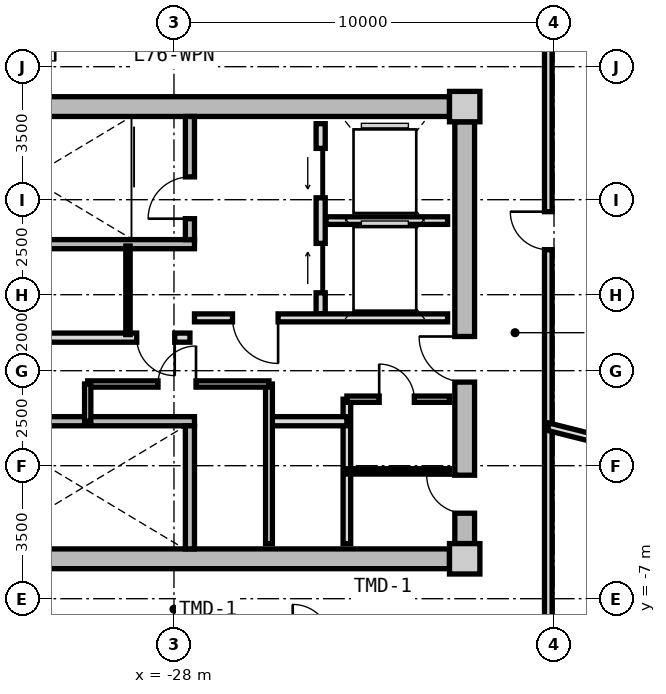
"""IFC4 building model, lengths in metres.
Left out: names, types, materials, properties, quantities, classifications, styles, units other than length and angle.
Written with IfcOpenShell. Run it as: python <this file> out.ifc"""

import sys

from ifc_helpers import new_model, si_unit, direction, frame, frame_2d, origin, origin_2d, place, context, subcontext, project, spatial, rectangle, extrude, source, transform, mapped, element, fill, save


model = new_model("IFC4")
c1 = context("Model", 3, precision=1e-05, world=origin(), true_north=direction((0.0, 1.0)))
c2 = subcontext(c1, "Body", "Model", "MODEL_VIEW")
j1 = project(units=[si_unit("LENGTHUNIT", "METRE"), si_unit("PLANEANGLEUNIT", "RADIAN")], contexts=[c1])
p1 = place(None, origin())
s1 = spatial("IfcSite", under=j1, at=p1, CompositionType="ELEMENT")
p2 = place(p1, origin())
s2 = spatial("IfcBuilding", under=s1, at=p2, CompositionType="ELEMENT")
p3 = place(p2, frame((0.0, 0.0, 244.4)))
s3 = spatial("IfcBuildingStorey", under=s2, at=p3, CompositionType="ELEMENT", Elevation=244.4)
m1 = source(origin(), c2, "Body", "SweptSolid", [
    extrude(rectangle(XDim=0.8, YDim=0.8, at=origin_2d()), origin(), (0.0, 0.0, 1.0), 5.45),
])
for number, where, z_axis, x_axis in (
    (1, (-20.35, -5.95, 0.0), (0.0, 0.0, 1.0), (1.0, 0.0, 0.0)),
    (2, (-20.35, 5.95, 0.0), (0.0, 0.0, 1.0), (1.0, 0.0, 0.0)),
):
    element("IfcColumn", number, at=place(p3, frame(where, z_axis=z_axis, x_axis=x_axis)), inside=s3, PredefinedType="COLUMN", context=c2, shape_type="MappedRepresentation", body=[
        mapped(m1, transform((0.0, 0.0, 0.0), x_axis=(1.0, 0.0, 0.0), y_axis=(0.0, 1.0, 0.0), z_axis=(0.0, 0.0, 1.0), scale=1.0)),
    ])
m2 = source(origin(), c2, "Body", "SweptSolid", [
    extrude(rectangle(XDim=14.5, YDim=0.52, at=frame_2d((7.25, 0.0))), origin(), (0.0, 0.0, 1.0), 5.175),
])
for number, where, z_axis, x_axis in (
    (3, (-35.25, 5.95, 0.0), (0.0, 0.0, 1.0), (1.0, 0.0, 0.0)),
    (4, (-20.75, -5.95, 0.0), (0.0, 0.0, 1.0), (-1.0, 0.0, 0.0)),
):
    element("IfcWall", number, at=place(p3, frame(where, z_axis=z_axis, x_axis=x_axis)), inside=s3, PredefinedType="SHEAR", context=c2, shape_type="MappedRepresentation", body=[
        mapped(m2, transform((0.0, 0.0, 0.0), x_axis=(1.0, 0.0, 0.0), y_axis=(0.0, 1.0, 0.0), z_axis=(0.0, 0.0, 1.0), scale=1.0)),
    ])
m3 = source(origin(), c2, "Body", "SweptSolid", [
    extrude(rectangle(XDim=11.1, YDim=0.52, at=frame_2d((5.55, 0.0))), origin(), (0.0, 0.0, 1.0), 5.175),
])
p4 = place(p3, frame((-20.35, 5.55, 0.0), z_axis=(0.0, 0.0, 1.0), x_axis=(0.0, -1.0, 0.0)))
e5 = element("IfcWall", 5, at=p4, inside=s3, PredefinedType="SHEAR", context=c2, shape_type="MappedRepresentation", body=[
    mapped(m3, transform((0.0, 0.0, 0.0), x_axis=(1.0, 0.0, 0.0), y_axis=(0.0, 1.0, 0.0), z_axis=(0.0, 0.0, 1.0), scale=1.0)),
])
p5 = place(p4, frame((5.65, 0.0, 0.0)))
e6 = element("IfcOpeningElement", 6, at=p5, cuts=e5, PredefinedType="OPENING", context=c2, shape_type="SweptSolid", body=[
    extrude(rectangle(XDim=1.2, YDim=2.15, at=frame_2d((0.6, 1.075))), frame((0.0, 0.27, 0.0), z_axis=(0.0, -1.0, 0.0), x_axis=(1.0, 0.0, 0.0)), (0.0, 0.0, 1.0), 0.54),
])
p6 = place(p4, frame((9.3, 0.0, 0.0)))
e7 = element("IfcOpeningElement", 7, at=p6, cuts=e5, PredefinedType="OPENING", context=c2, shape_type="SweptSolid", body=[
    extrude(rectangle(XDim=1.0, YDim=2.1, at=frame_2d((0.5, 1.05))), frame((0.0, 0.27, 0.0), z_axis=(0.0, -1.0, 0.0), x_axis=(1.0, 0.0, 0.0)), (0.0, 0.0, 1.0), 0.54),
])
m4 = source(origin(), c2, "Body", "SweptSolid", [
    extrude(rectangle(XDim=7.93, YDim=0.24, at=frame_2d((3.965, 0.0))), origin(), (0.0, 0.0, 1.0), 5.175),
])
p7 = place(p3, frame((-35.39, 2.33, 0.0), z_axis=(0.0, 0.0, 1.0), x_axis=(1.0, 0.0, 0.0)))
e8 = element("IfcWall", 8, at=p7, inside=s3, PredefinedType="PARTITIONING", context=c2, shape_type="MappedRepresentation", body=[
    mapped(m4, transform((0.0, 0.0, 0.0), x_axis=(1.0, 0.0, 0.0), y_axis=(0.0, 1.0, 0.0), z_axis=(0.0, 0.0, 1.0), scale=1.0)),
])
m5 = source(origin(), c2, "Body", "SweptSolid", [
    extrude(rectangle(XDim=3.24, YDim=0.24, at=frame_2d((1.62, 0.0))), origin(), (0.0, 0.0, 1.0), 5.175),
])
p8 = place(p3, frame((-27.58, 2.45, 0.0), z_axis=(0.0, 0.0, 1.0), x_axis=(0.0, 1.0, 0.0)))
e9 = element("IfcWall", 9, at=p8, inside=s3, PredefinedType="PARTITIONING", context=c2, shape_type="MappedRepresentation", body=[
    mapped(m5, transform((0.0, 0.0, 0.0), x_axis=(1.0, 0.0, 0.0), y_axis=(0.0, 1.0, 0.0), z_axis=(0.0, 0.0, 1.0), scale=1.0)),
])
p9 = place(p8, frame((0.55, 0.0, 0.0)))
e10 = element("IfcOpeningElement", 10, at=p9, cuts=e9, PredefinedType="OPENING", context=c2, shape_type="SweptSolid", body=[
    extrude(rectangle(XDim=1.1, YDim=2.15, at=frame_2d((0.55, 1.075))), frame((0.0, 0.13, 0.0), z_axis=(0.0, -1.0, 0.0), x_axis=(1.0, 0.0, 0.0)), (0.0, 0.0, 1.0), 0.26),
])
p10 = place(p3, frame((-35.39, -2.33, 0.0), z_axis=(0.0, 0.0, 1.0), x_axis=(1.0, 0.0, 0.0)))
e11 = element("IfcWall", 11, at=p10, inside=s3, PredefinedType="PARTITIONING", context=c2, shape_type="MappedRepresentation", body=[
    mapped(m4, transform((0.0, 0.0, 0.0), x_axis=(1.0, 0.0, 0.0), y_axis=(0.0, 1.0, 0.0), z_axis=(0.0, 0.0, 1.0), scale=1.0)),
])
p11 = place(p10, frame((1.05, 0.0, 0.0)))
e12 = element("IfcOpeningElement", 12, at=p11, cuts=e11, PredefinedType="OPENING", context=c2, shape_type="SweptSolid", body=[
    extrude(rectangle(XDim=1.1, YDim=2.15, at=frame_2d((0.55, 1.075))), frame((0.0, 0.13, 0.0), z_axis=(0.0, -1.0, 0.0), x_axis=(1.0, 0.0, 0.0)), (0.0, 0.0, 1.0), 0.26),
])
p12 = place(p3, frame((-27.58, -5.69, 0.0), z_axis=(0.0, 0.0, 1.0), x_axis=(0.0, 1.0, 0.0)))
e13 = element("IfcWall", 13, at=p12, inside=s3, PredefinedType="PARTITIONING", context=c2, shape_type="MappedRepresentation", body=[
    mapped(m5, transform((0.0, 0.0, 0.0), x_axis=(1.0, 0.0, 0.0), y_axis=(0.0, 1.0, 0.0), z_axis=(0.0, 0.0, 1.0), scale=1.0)),
])
m6 = source(origin(), c2, "Body", "SweptSolid", [
    extrude(rectangle(XDim=5.0, YDim=0.24, at=frame_2d((2.5, 0.0))), origin(), (0.0, 0.0, 1.0), 5.16),
])
p13 = place(p3, frame((-24.14, 0.5, 0.0), z_axis=(0.0, 0.0, 1.0), x_axis=(0.0, 1.0, 0.0)))
e14 = element("IfcWall", 14, at=p13, inside=s3, PredefinedType="PARTITIONING", context=c2, shape_type="MappedRepresentation", body=[
    mapped(m6, transform((0.0, 0.0, 0.0), x_axis=(1.0, 0.0, 0.0), y_axis=(0.0, 1.0, 0.0), z_axis=(0.0, 0.0, 1.0), scale=1.0)),
])
p14 = place(p13, frame((3.05, 0.0, 0.0)))
e15 = element("IfcOpeningElement", 15, at=p14, cuts=e14, PredefinedType="OPENING", context=c2, shape_type="SweptSolid", body=[
    extrude(rectangle(XDim=1.3, YDim=2.2, at=frame_2d((0.65, 1.1))), frame((0.0, 0.13, 0.0), z_axis=(0.0, -1.0, 0.0), x_axis=(1.0, 0.0, 0.0)), (0.0, 0.0, 1.0), 0.26),
])
p15 = place(p13, frame((0.55, 0.0, 0.0)))
e16 = element("IfcOpeningElement", 16, at=p15, cuts=e14, PredefinedType="OPENING", context=c2, shape_type="SweptSolid", body=[
    extrude(rectangle(XDim=1.3, YDim=2.2, at=frame_2d((0.65, 1.1))), frame((0.0, 0.13, 0.0), z_axis=(0.0, -1.0, 0.0), x_axis=(1.0, 0.0, 0.0)), (0.0, 0.0, 1.0), 0.26),
])
m7 = source(origin(), c2, "Body", "SweptSolid", [
    extrude(rectangle(XDim=3.2, YDim=0.2, at=frame_2d((1.6, 0.0))), origin(), (0.0, 0.0, 1.0), 5.16),
])
p16 = place(p3, frame((-24.0, 2.95, 0.0), z_axis=(0.0, 0.0, 1.0), x_axis=(1.0, 0.0, 0.0)))
e17 = element("IfcWall", 17, at=p16, inside=s3, PredefinedType="PARTITIONING", context=c2, shape_type="MappedRepresentation", body=[
    mapped(m7, transform((0.0, 0.0, 0.0), x_axis=(1.0, 0.0, 0.0), y_axis=(0.0, 1.0, 0.0), z_axis=(0.0, 0.0, 1.0), scale=1.0)),
])
m8 = source(origin(), c2, "Body", "SweptSolid", [
    extrude(rectangle(XDim=6.66, YDim=0.21, at=frame_2d((3.33, 0.0))), origin(), (0.0, 0.0, 1.0), 5.16),
])
p17 = place(p3, frame((-27.46, 0.39, 0.0), z_axis=(0.0, 0.0, 1.0), x_axis=(1.0, 0.0, 0.0)))
e18 = element("IfcWall", 18, at=p17, inside=s3, PredefinedType="PARTITIONING", context=c2, shape_type="MappedRepresentation", body=[
    mapped(m8, transform((0.0, 0.0, 0.0), x_axis=(1.0, 0.0, 0.0), y_axis=(0.0, 1.0, 0.0), z_axis=(0.0, 0.0, 1.0), scale=1.0)),
])
p18 = place(p17, frame((1.0, 0.0, 0.0)))
e19 = element("IfcOpeningElement", 19, at=p18, cuts=e18, PredefinedType="OPENING", context=c2, shape_type="SweptSolid", body=[
    extrude(rectangle(XDim=1.2, YDim=2.15, at=frame_2d((0.6, 1.075))), frame((0.0, 0.115, 0.0), z_axis=(0.0, -1.0, 0.0), x_axis=(1.0, 0.0, 0.0)), (0.0, 0.0, 1.0), 0.23),
])
m9 = source(origin(), c2, "Body", "SweptSolid", [
    extrude(rectangle(XDim=7.62, YDim=0.24, at=frame_2d((3.81, 0.0))), origin(), (0.0, 0.0, 1.0), 5.16),
])
p19 = place(p3, frame((-35.2, -0.13, 0.0), z_axis=(0.0, 0.0, 1.0), x_axis=(1.0, 0.0, 0.0)))
e20 = element("IfcWall", 20, at=p19, inside=s3, PredefinedType="PARTITIONING", context=c2, shape_type="MappedRepresentation", body=[
    mapped(m9, transform((0.0, 0.0, 0.0), x_axis=(1.0, 0.0, 0.0), y_axis=(0.0, 1.0, 0.0), z_axis=(0.0, 0.0, 1.0), scale=1.0)),
])
p20 = place(p19, frame((6.22, 0.0, 0.0)))
e21 = element("IfcOpeningElement", 21, at=p20, cuts=e20, PredefinedType="OPENING", context=c2, shape_type="SweptSolid", body=[
    extrude(rectangle(XDim=1.0, YDim=2.1, at=frame_2d((0.5, 1.05))), frame((0.0, 0.13, 0.0), z_axis=(0.0, -1.0, 0.0), x_axis=(1.0, 0.0, 0.0)), (0.0, 0.0, 1.0), 0.26),
])
p21 = place(p19, frame((2.4, 0.0, 0.0)))
e22 = element("IfcOpeningElement", 22, at=p21, cuts=e20, PredefinedType="OPENING", context=c2, shape_type="SweptSolid", body=[
    extrude(rectangle(XDim=1.0, YDim=2.1, at=frame_2d((0.5, 1.05))), frame((0.0, 0.13, 0.0), z_axis=(0.0, -1.0, 0.0), x_axis=(1.0, 0.0, 0.0)), (0.0, 0.0, 1.0), 0.26),
])
m10 = source(origin(), c2, "Body", "SweptSolid", [
    extrude(rectangle(XDim=2.33, YDim=0.115, at=frame_2d((1.165, 0.0))), origin(), (0.0, 0.0, 1.0), 5.16),
])
p22 = place(p3, frame((-29.21, -0.05, 0.0), z_axis=(0.0, 0.0, 1.0), x_axis=(0.0, 1.0, 0.0)))
e23 = element("IfcWall", 23, at=p22, inside=s3, PredefinedType="PARTITIONING", context=c2, shape_type="MappedRepresentation", body=[
    mapped(m10, transform((0.0, 0.0, 0.0), x_axis=(1.0, 0.0, 0.0), y_axis=(0.0, 1.0, 0.0), z_axis=(0.0, 0.0, 1.0), scale=1.0)),
])
m11 = source(origin(), c2, "Body", "SweptSolid", [
    extrude(rectangle(XDim=3.8, YDim=0.2, at=frame_2d((1.9, 0.0))), origin(), (0.0, 0.0, 1.0), 5.16),
])
p23 = place(p3, frame((-23.45, -5.55, 0.0), z_axis=(0.0, 0.0, 1.0), x_axis=(0.0, 1.0, 0.0)))
e24 = element("IfcWall", 24, at=p23, inside=s3, PredefinedType="PARTITIONING", context=c2, shape_type="MappedRepresentation", body=[
    mapped(m11, transform((0.0, 0.0, 0.0), x_axis=(1.0, 0.0, 0.0), y_axis=(0.0, 1.0, 0.0), z_axis=(0.0, 0.0, 1.0), scale=1.0)),
])
m12 = source(origin(), c2, "Body", "SweptSolid", [
    extrude(rectangle(XDim=2.05, YDim=0.24, at=frame_2d((1.025, 0.0))), origin(), (0.0, 0.0, 1.0), 5.16),
])
p24 = place(p3, frame((-25.5, -2.33, 0.0), z_axis=(0.0, 0.0, 1.0), x_axis=(1.0, 0.0, 0.0)))
e25 = element("IfcWall", 25, at=p24, inside=s3, PredefinedType="PARTITIONING", context=c2, shape_type="MappedRepresentation", body=[
    mapped(m12, transform((0.0, 0.0, 0.0), x_axis=(1.0, 0.0, 0.0), y_axis=(0.0, 1.0, 0.0), z_axis=(0.0, 0.0, 1.0), scale=1.0)),
])
m13 = source(origin(), c2, "Body", "SweptSolid", [
    extrude(rectangle(XDim=4.2, YDim=0.18, at=frame_2d((2.1, 0.0))), origin(), (0.0, 0.0, 1.0), 5.16),
])
p25 = place(p3, frame((-25.5, -5.55, 0.0), z_axis=(0.0, 0.0, 1.0), x_axis=(0.0, 1.0, 0.0)))
e26 = element("IfcWall", 26, at=p25, inside=s3, PredefinedType="PARTITIONING", context=c2, shape_type="MappedRepresentation", body=[
    mapped(m13, transform((0.0, 0.0, 0.0), x_axis=(1.0, 0.0, 0.0), y_axis=(0.0, 1.0, 0.0), z_axis=(0.0, 0.0, 1.0), scale=1.0)),
])
m14 = source(origin(), c2, "Body", "SweptSolid", [
    extrude(rectangle(XDim=4.77, YDim=0.165, at=frame_2d((2.385, 0.0))), origin(), (0.0, 0.0, 1.0), 5.16),
])
p26 = place(p3, frame((-30.27, -1.35, 0.0), z_axis=(0.0, 0.0, 1.0), x_axis=(1.0, 0.0, 0.0)))
e27 = element("IfcWall", 27, at=p26, inside=s3, PredefinedType="PARTITIONING", context=c2, shape_type="MappedRepresentation", body=[
    mapped(m14, transform((0.0, 0.0, 0.0), x_axis=(1.0, 0.0, 0.0), y_axis=(0.0, 1.0, 0.0), z_axis=(0.0, 0.0, 1.0), scale=1.0)),
])
p27 = place(p26, frame((1.85, 0.0, 0.0)))
e28 = element("IfcOpeningElement", 28, at=p27, cuts=e27, PredefinedType="OPENING", context=c2, shape_type="SweptSolid", body=[
    extrude(rectangle(XDim=1.0, YDim=2.1, at=frame_2d((0.5, 1.05))), frame((0.0, 0.093, 0.0), z_axis=(0.0, -1.0, 0.0), x_axis=(1.0, 0.0, 0.0)), (0.0, 0.0, 1.0), 0.185),
])
m15 = source(origin(), c2, "Body", "SweptSolid", [
    extrude(rectangle(XDim=0.98, YDim=0.165, at=frame_2d((0.49, 0.0))), origin(), (0.0, 0.0, 1.0), 5.16),
])
p28 = place(p3, frame((-30.27, -2.33, 0.0), z_axis=(0.0, 0.0, 1.0), x_axis=(0.0, 1.0, 0.0)))
e29 = element("IfcWall", 29, at=p28, inside=s3, PredefinedType="PARTITIONING", context=c2, shape_type="MappedRepresentation", body=[
    mapped(m15, transform((0.0, 0.0, 0.0), x_axis=(1.0, 0.0, 0.0), y_axis=(0.0, 1.0, 0.0), z_axis=(0.0, 0.0, 1.0), scale=1.0)),
])
m16 = source(origin(), c2, "Body", "SweptSolid", [
    extrude(rectangle(XDim=2.7, YDim=0.165, at=frame_2d((1.35, 0.0))), origin(), (0.0, 0.0, 1.0), 5.16),
])
p29 = place(p3, frame((-23.45, -1.75, 0.0), z_axis=(0.0, 0.0, 1.0), x_axis=(1.0, 0.0, 0.0)))
e30 = element("IfcWall", 30, at=p29, inside=s3, PredefinedType="PARTITIONING", context=c2, shape_type="MappedRepresentation", body=[
    mapped(m16, transform((0.0, 0.0, 0.0), x_axis=(1.0, 0.0, 0.0), y_axis=(0.0, 1.0, 0.0), z_axis=(0.0, 0.0, 1.0), scale=1.0)),
])
p30 = place(p29, frame((0.85, 0.0, 0.0)))
e31 = element("IfcOpeningElement", 31, at=p30, cuts=e30, PredefinedType="OPENING", context=c2, shape_type="SweptSolid", body=[
    extrude(rectangle(XDim=0.925, YDim=2.1, at=frame_2d((0.462, 1.05))), frame((0.0, 0.093, 0.0), z_axis=(0.0, -1.0, 0.0), x_axis=(1.0, 0.0, 0.0)), (0.0, 0.0, 1.0), 0.185),
])
m17 = source(origin(), c2, "Body", "SweptSolid", [
    extrude(rectangle(XDim=2.7, YDim=0.14, at=frame_2d((1.35, 0.0))), origin(), (0.0, 0.0, 1.0), 5.16),
])
p31 = place(p3, frame((-23.45, -3.65, 0.0), z_axis=(0.0, 0.0, 1.0), x_axis=(1.0, 0.0, 0.0)))
e32 = element("IfcWall", 32, at=p31, inside=s3, PredefinedType="PARTITIONING", context=c2, shape_type="MappedRepresentation", body=[
    mapped(m17, transform((0.0, 0.0, 0.0), x_axis=(1.0, 0.0, 0.0), y_axis=(0.0, 1.0, 0.0), z_axis=(0.0, 0.0, 1.0), scale=1.0)),
])
m18 = source(origin(), c2, "Body", "SweptSolid", [
    extrude(rectangle(XDim=16.3, YDim=0.2, at=frame_2d((8.15, 0.0))), origin(), (0.0, 0.0, 1.0), 5.16),
])
p32 = place(p3, frame((-18.15, 8.15, 0.0), z_axis=(0.0, 0.0, 1.0), x_axis=(0.0, -1.0, 0.0)))
e33 = element("IfcWall", 33, at=p32, inside=s3, PredefinedType="PARTITIONING", context=c2, shape_type="MappedRepresentation", body=[
    mapped(m18, transform((0.0, 0.0, 0.0), x_axis=(1.0, 0.0, 0.0), y_axis=(0.0, 1.0, 0.0), z_axis=(0.0, 0.0, 1.0), scale=1.0)),
])
p33 = place(p32, frame((4.966, 0.0, 0.0)))
e34 = element("IfcOpeningElement", 34, at=p33, cuts=e33, PredefinedType="OPENING", context=c2, shape_type="SweptSolid", body=[
    extrude(rectangle(XDim=1.0, YDim=2.1, at=frame_2d((0.5, 1.05))), frame((0.0, 0.11, 0.0), z_axis=(0.0, -1.0, 0.0), x_axis=(1.0, 0.0, 0.0)), (0.0, 0.0, 1.0), 0.22),
])
m19 = source(origin(), c2, "Body", "SweptSolid", [
    extrude(rectangle(XDim=5.879, YDim=0.2, at=frame_2d((2.939, 0.0))), origin(), (0.0, 0.0, 1.0), 4.76),
])
p34 = place(p3, frame((-18.15, -2.475, 0.0), z_axis=(0.0, 0.0, 1.0), x_axis=(0.96984127658, -0.24373735504, 0.0)))
e35 = element("IfcWall", 35, at=p34, inside=s3, PredefinedType="PARTITIONING", context=c2, shape_type="MappedRepresentation", body=[
    mapped(m19, transform((0.0, 0.0, 0.0), x_axis=(1.0, 0.0, 0.0), y_axis=(0.0, 1.0, 0.0), z_axis=(0.0, 0.0, 1.0), scale=1.0)),
])
m20 = source(origin(), c2, "Body", "SweptSolid", [
    extrude(rectangle(XDim=1.1, YDim=2.15, at=frame_2d((0.55, 1.075))), frame((0.0, 0.025, 0.0), z_axis=(0.0, -1.0, 0.0), x_axis=(1.0, 0.0, 0.0)), (0.0, 0.0, 1.0), 0.05),
])
p35 = place(p9, origin())
e36 = element("IfcDoor", 36, at=p35, inside=s3, OperationType="SINGLE_SWING_LEFT", PredefinedType="DOOR", context=c2, shape_type="MappedRepresentation", body=[
    mapped(m20, transform((0.0, 0.0, 0.0), x_axis=(1.0, 0.0, 0.0), y_axis=(0.0, 1.0, 0.0), z_axis=(0.0, 0.0, 1.0), scale=1.0)),
])
fill(e10, e36)
m21 = source(origin(), c2, "Body", "SweptSolid", [
    extrude(rectangle(XDim=1.3, YDim=2.2, at=frame_2d((0.65, 1.1))), frame((0.0, 0.025, 0.0), z_axis=(0.0, -1.0, 0.0), x_axis=(1.0, 0.0, 0.0)), (0.0, 0.0, 1.0), 0.05),
])
p36 = place(p14, origin())
e37 = element("IfcDoor", 37, at=p36, inside=s3, OperationType="SLIDING_TO_LEFT", PredefinedType="DOOR", context=c2, shape_type="MappedRepresentation", body=[
    mapped(m21, transform((0.0, 0.0, 0.0), x_axis=(1.0, 0.0, 0.0), y_axis=(0.0, 1.0, 0.0), z_axis=(0.0, 0.0, 1.0), scale=1.0)),
])
fill(e15, e37)
p37 = place(p15, origin())
e38 = element("IfcDoor", 38, at=p37, inside=s3, OperationType="SLIDING_TO_RIGHT", PredefinedType="DOOR", context=c2, shape_type="MappedRepresentation", body=[
    mapped(m21, transform((0.0, 0.0, 0.0), x_axis=(1.0, 0.0, 0.0), y_axis=(0.0, 1.0, 0.0), z_axis=(0.0, 0.0, 1.0), scale=1.0)),
])
fill(e16, e38)
m22 = source(origin(), c2, "Body", "SweptSolid", [
    extrude(rectangle(XDim=1.2, YDim=2.15, at=frame_2d((0.6, 1.075))), frame((0.0, 0.025, 0.0), z_axis=(0.0, -1.0, 0.0), x_axis=(1.0, 0.0, 0.0)), (0.0, 0.0, 1.0), 0.05),
])
p38 = place(p18, frame((1.2, 0.0, 0.0), z_axis=(0.0, 0.0, 1.0), x_axis=(-1.0, 0.0, 0.0)))
e39 = element("IfcDoor", 39, at=p38, inside=s3, OperationType="SINGLE_SWING_LEFT", PredefinedType="DOOR", context=c2, shape_type="MappedRepresentation", body=[
    mapped(m22, transform((0.0, 0.0, 0.0), x_axis=(1.0, 0.0, 0.0), y_axis=(0.0, 1.0, 0.0), z_axis=(0.0, 0.0, 1.0), scale=1.0)),
])
fill(e19, e39)
p39 = place(p5, frame((1.2, 0.0, 0.0), z_axis=(0.0, 0.0, 1.0), x_axis=(-1.0, 0.0, 0.0)))
e40 = element("IfcDoor", 40, at=p39, inside=s3, OperationType="SINGLE_SWING_RIGHT", PredefinedType="DOOR", context=c2, shape_type="MappedRepresentation", body=[
    mapped(m22, transform((0.0, 0.0, 0.0), x_axis=(1.0, 0.0, 0.0), y_axis=(0.0, 1.0, 0.0), z_axis=(0.0, 0.0, 1.0), scale=1.0)),
])
fill(e6, e40)
m23 = source(origin(), c2, "Body", "SweptSolid", [
    extrude(rectangle(XDim=1.0, YDim=2.1, at=frame_2d((0.5, 1.05))), frame((0.0, 0.025, 0.0), z_axis=(0.0, -1.0, 0.0), x_axis=(1.0, 0.0, 0.0)), (0.0, 0.0, 1.0), 0.05),
])
p40 = place(p20, frame((1.0, 0.0, 0.0), z_axis=(0.0, 0.0, 1.0), x_axis=(-1.0, 0.0, 0.0)))
e41 = element("IfcDoor", 41, at=p40, inside=s3, OperationType="SINGLE_SWING_LEFT", PredefinedType="DOOR", context=c2, shape_type="MappedRepresentation", body=[
    mapped(m23, transform((0.0, 0.0, 0.0), x_axis=(1.0, 0.0, 0.0), y_axis=(0.0, 1.0, 0.0), z_axis=(0.0, 0.0, 1.0), scale=1.0)),
])
fill(e21, e41)
p41 = place(p27, origin())
e42 = element("IfcDoor", 42, at=p41, inside=s3, OperationType="SINGLE_SWING_RIGHT", PredefinedType="DOOR", context=c2, shape_type="MappedRepresentation", body=[
    mapped(m23, transform((0.0, 0.0, 0.0), x_axis=(1.0, 0.0, 0.0), y_axis=(0.0, 1.0, 0.0), z_axis=(0.0, 0.0, 1.0), scale=1.0)),
])
fill(e28, e42)
m24 = source(origin(), c2, "Body", "SweptSolid", [
    extrude(rectangle(XDim=0.925, YDim=2.1, at=frame_2d((0.462, 1.05))), frame((0.0, 0.025, 0.0), z_axis=(0.0, -1.0, 0.0), x_axis=(1.0, 0.0, 0.0)), (0.0, 0.0, 1.0), 0.05),
])
p42 = place(p30, origin())
e43 = element("IfcDoor", 43, at=p42, inside=s3, OperationType="SINGLE_SWING_LEFT", PredefinedType="DOOR", context=c2, shape_type="MappedRepresentation", body=[
    mapped(m24, transform((0.0, 0.0, 0.0), x_axis=(1.0, 0.0, 0.0), y_axis=(0.0, 1.0, 0.0), z_axis=(0.0, 0.0, 1.0), scale=1.0)),
])
fill(e31, e43)
p43 = place(p6, frame((1.0, 0.0, 0.0), z_axis=(0.0, 0.0, 1.0), x_axis=(-1.0, 0.0, 0.0)))
e44 = element("IfcDoor", 44, at=p43, inside=s3, OperationType="SINGLE_SWING_RIGHT", PredefinedType="DOOR", context=c2, shape_type="MappedRepresentation", body=[
    mapped(m23, transform((0.0, 0.0, 0.0), x_axis=(1.0, 0.0, 0.0), y_axis=(0.0, 1.0, 0.0), z_axis=(0.0, 0.0, 1.0), scale=1.0)),
])
fill(e7, e44)
p44 = place(p33, frame((1.0, 0.0, 0.0), z_axis=(0.0, 0.0, 1.0), x_axis=(-1.0, 0.0, 0.0)))
e45 = element("IfcDoor", 45, at=p44, inside=s3, OperationType="SINGLE_SWING_RIGHT", PredefinedType="DOOR", context=c2, shape_type="MappedRepresentation", body=[
    mapped(m23, transform((0.0, 0.0, 0.0), x_axis=(1.0, 0.0, 0.0), y_axis=(0.0, 1.0, 0.0), z_axis=(0.0, 0.0, 1.0), scale=1.0)),
])
fill(e34, e45)
save(model, sys.argv[1])
